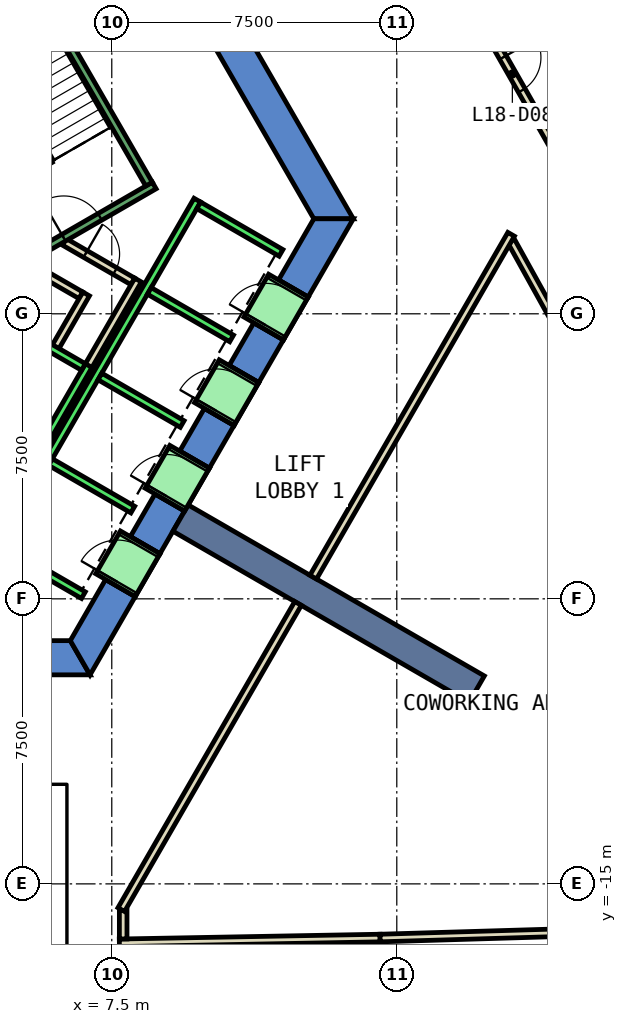
"""IFC4 building model, lengths in metres.
Left out: names, types, materials, properties, quantities, classifications, styles, units other than length and angle.
Written with IfcOpenShell. Run it as: python <this file> out.ifc"""

import sys

from ifc_helpers import new_model, si_unit, direction, frame, frame_2d, origin, place, context, subcontext, project, spatial, polyline, rectangle, outline, extrude, element, fill, save


model = new_model("IFC4")
c1 = context("Model", 3, precision=1e-05, world=origin(), true_north=direction((0.0, 1.0)))
c2 = subcontext(c1, "Body", "Model", "MODEL_VIEW")
j1 = project(units=[si_unit("LENGTHUNIT", "METRE"), si_unit("PLANEANGLEUNIT", "RADIAN")], contexts=[c1])
p1 = place(None, origin())
s1 = spatial("IfcSite", under=j1, at=p1, CompositionType="ELEMENT")
p2 = place(p1, origin())
s2 = spatial("IfcBuilding", under=s1, at=p2, CompositionType="ELEMENT")
p3 = place(p2, frame((0.0, 0.0, 86.6)))
s3 = spatial("IfcBuildingStorey", under=s2, at=p3, CompositionType="ELEMENT", Elevation=86.6)
p4 = place(p3, frame((0.0, 0.0, -0.6)))
e1 = element("IfcWall", 1, at=p4, inside=s3, PredefinedType="SHEAR", context=c2, shape_type="SweptSolid", body=[
    extrude(outline(polyline([(8.517, 11.748), (7.738, 11.298), (12.817, 2.5), (13.856, 2.5), (8.517, 11.748)])), origin(), (0.0, 0.0, 1.0), 4.4),
])
p5 = place(p3, frame((0.0, 0.0, -0.6)))
e2 = element("IfcWall", 2, at=p5, inside=s3, PredefinedType="SHEAR", context=c2, shape_type="SweptSolid", body=[
    extrude(outline(polyline([(5.75, -8.6), (5.75, -9.5), (6.928, -9.5), (6.409, -8.6), (5.75, -8.6)])), origin(), (0.0, 0.0, 1.0), 4.4),
])
p6 = place(p3, frame((0.0, 0.0, -0.6)))
e3 = element("IfcWall", 3, at=p6, inside=s3, PredefinedType="SHEAR", context=c2, shape_type="SweptSolid", body=[
    extrude(outline(polyline([(8.117, -7.44), (7.338, -6.99), (6.409, -8.6), (6.928, -9.5), (8.117, -7.44)])), origin(), (0.0, 0.0, 1.0), 4.4),
])
p7 = place(p3, frame((0.0, 0.0, -0.6)))
e4 = element("IfcWall", 4, at=p7, inside=s3, PredefinedType="SHEAR", context=c2, shape_type="SweptSolid", body=[
    extrude(outline(polyline([(9.417, -5.189), (8.638, -4.739), (7.988, -5.864), (8.767, -6.314), (9.417, -5.189)])), origin(), (0.0, 0.0, 1.0), 4.4),
])
p8 = place(p3, frame((0.0, 0.0, -0.6)))
e5 = element("IfcWall", 5, at=p8, inside=s3, PredefinedType="SHEAR", context=c2, shape_type="SweptSolid", body=[
    extrude(outline(polyline([(10.717, -2.937), (9.938, -2.487), (9.288, -3.613), (10.067, -4.063), (10.717, -2.937)])), origin(), (0.0, 0.0, 1.0), 4.4),
])
p9 = place(p3, frame((0.0, 0.0, -0.6)))
e6 = element("IfcWall", 6, at=p9, inside=s3, PredefinedType="SHEAR", context=c2, shape_type="SweptSolid", body=[
    extrude(outline(polyline([(12.017, -0.686), (11.238, -0.236), (10.588, -1.361), (11.367, -1.811), (12.017, -0.686)])), origin(), (0.0, 0.0, 1.0), 4.4),
])
p10 = place(p3, frame((0.0, 0.0, -0.6)))
e7 = element("IfcWall", 7, at=p10, inside=s3, PredefinedType="SHEAR", context=c2, shape_type="SweptSolid", body=[
    extrude(outline(polyline([(11.888, 0.89), (12.667, 0.44), (13.856, 2.5), (12.817, 2.5), (11.888, 0.89)])), origin(), (0.0, 0.0, 1.0), 4.4),
])
p11 = place(p3, frame((0.0, 0.0, 3.6)))
e8 = element("IfcWall", 8, at=p11, inside=s3, PredefinedType="SHEAR", context=c2, shape_type="SweptSolid", body=[
    extrude(outline(polyline([(8.767, -6.314), (7.988, -5.864), (7.338, -6.99), (8.117, -7.44), (8.767, -6.314)])), origin(), (0.0, 0.0, 1.0), 0.2),
])
p12 = place(p3, frame((0.0, 0.0, 3.6)))
e9 = element("IfcWall", 9, at=p12, inside=s3, PredefinedType="SHEAR", context=c2, shape_type="SweptSolid", body=[
    extrude(outline(polyline([(10.067, -4.063), (9.288, -3.613), (8.638, -4.739), (9.417, -5.189), (10.067, -4.063)])), origin(), (0.0, 0.0, 1.0), 0.2),
])
p13 = place(p3, frame((0.0, 0.0, 3.6)))
e10 = element("IfcWall", 10, at=p13, inside=s3, PredefinedType="SHEAR", context=c2, shape_type="SweptSolid", body=[
    extrude(outline(polyline([(11.367, -1.811), (10.588, -1.361), (9.938, -2.487), (10.717, -2.937), (11.367, -1.811)])), origin(), (0.0, 0.0, 1.0), 0.2),
])
p14 = place(p3, frame((0.0, 0.0, 3.6)))
e11 = element("IfcWall", 11, at=p14, inside=s3, PredefinedType="SHEAR", context=c2, shape_type="SweptSolid", body=[
    extrude(outline(polyline([(12.667, 0.44), (11.888, 0.89), (11.238, -0.236), (12.017, -0.686), (12.667, 0.44)])), origin(), (0.0, 0.0, 1.0), 0.2),
])
p15 = place(p3, frame((9.31, -5.375, -0.6), z_axis=(0.0, 0.0, 1.0), x_axis=(0.866017533419, -0.500013631625, 0.0)))
e12 = element("IfcWall", 12, at=p15, inside=s3, PredefinedType="SHEAR", context=c2, shape_type="SweptSolid", body=[
    extrude(rectangle(XDim=9.0, YDim=0.8, at=frame_2d((4.5, 0.0))), origin(), (0.0, 0.0, 1.0), 4.4),
])
p16 = place(p3, frame((7.7, -16.551, 0.0), z_axis=(0.0, 0.0, 1.0), x_axis=(0.999831478914, 0.018357934851, 0.0)))
e13 = element("IfcWall", 13, at=p16, inside=s3, PredefinedType="PARTITIONING", context=c2, shape_type="SweptSolid", body=[
    extrude(rectangle(XDim=6.862, YDim=0.2, at=frame_2d((3.431, 0.0))), origin(), (0.0, 0.0, 1.0), 3.8),
])
p17 = place(p3, frame((14.561, -16.425, 0.0), z_axis=(0.0, 0.0, 1.0), x_axis=(0.99955668677, 0.029772973188, 0.0)))
e14 = element("IfcWall", 14, at=p17, inside=s3, PredefinedType="PARTITIONING", context=c2, shape_type="SweptSolid", body=[
    extrude(rectangle(XDim=6.888, YDim=0.2, at=frame_2d((3.444, 0.0))), origin(), (0.0, 0.0, 1.0), 3.8),
])
p18 = place(p3, frame((21.317, -4.053, 0.0), z_axis=(0.0, 0.0, 1.0), x_axis=(-0.484816829319, 0.874615711046, 0.0)))
e15 = element("IfcWall", 15, at=p18, inside=s3, PredefinedType="PARTITIONING", context=c2, shape_type="SweptSolid", body=[
    extrude(rectangle(XDim=6.827, YDim=0.2, at=frame_2d((3.414, 0.0))), origin(), (0.0, 0.0, 1.0), 3.8),
])
p19 = place(p3, frame((16.243, 9.465, 0.0), z_axis=(0.0, 0.0, 1.0), x_axis=(0.495081262009, -0.868846674625, 0.0)))
e16 = element("IfcWall", 16, at=p19, inside=s3, PredefinedType="PARTITIONING", context=c2, shape_type="SweptSolid", body=[
    extrude(rectangle(XDim=7.112, YDim=0.2, at=frame_2d((3.556, 0.0))), origin(), (0.0, 0.0, 1.0), 3.8),
])
p20 = place(p19, frame((3.131, 0.0, 0.0)))
e17 = element("IfcOpeningElement", 17, at=p20, cuts=e16, PredefinedType="OPENING", context=c2, shape_type="SweptSolid", body=[
    extrude(rectangle(XDim=1.0, YDim=2.1, at=frame_2d((0.5, 1.05))), frame((0.0, 0.11, 0.0), z_axis=(0.0, -1.0, 0.0), x_axis=(1.0, 0.0, 0.0)), (0.0, 0.0, 1.0), 0.22),
])
p21 = place(p3, frame((5.499, 1.172, 0.0), z_axis=(0.0, 0.0, 1.0), x_axis=(0.866333505267, -0.499465972466, 0.0)))
e18 = element("IfcWall", 18, at=p21, inside=s3, PredefinedType="PARTITIONING", context=c2, shape_type="SweptSolid", body=[
    extrude(rectangle(XDim=1.374, YDim=0.2, at=frame_2d((0.687, 0.0))), origin(), (0.0, 0.0, 1.0), 3.8),
])
p22 = place(p3, frame((6.826, 0.522, 0.0), z_axis=(0.0, 0.0, 1.0), x_axis=(-0.500016722714, -0.866015748706, 0.0)))
e19 = element("IfcWall", 19, at=p22, inside=s3, PredefinedType="PARTITIONING", context=c2, shape_type="SweptSolid", body=[
    extrude(rectangle(XDim=1.7, YDim=0.2, at=frame_2d((0.85, 0.0))), origin(), (0.0, 0.0, 1.0), 3.8),
])
p23 = place(p3, frame((6.25, 1.894, 0.0), z_axis=(0.0, 0.0, 1.0), x_axis=(0.866043184279, -0.499969202016, 0.0)))
e20 = element("IfcWall", 20, at=p23, inside=s3, PredefinedType="PARTITIONING", context=c2, shape_type="SweptSolid", body=[
    extrude(rectangle(XDim=2.084, YDim=0.2, at=frame_2d((1.042, 0.0))), origin(), (0.0, 0.0, 1.0), 3.8),
])
p24 = place(p23, frame((0.642, 0.0, 0.0)))
e21 = element("IfcOpeningElement", 21, at=p24, cuts=e20, PredefinedType="OPENING", context=c2, shape_type="SweptSolid", body=[
    extrude(rectangle(XDim=0.9, YDim=2.1, at=frame_2d((0.45, 1.05))), frame((0.0, 0.11, 0.0), z_axis=(0.0, -1.0, 0.0), x_axis=(1.0, 0.0, 0.0)), (0.0, 0.0, 1.0), 0.22),
])
p25 = place(p3, frame((8.192, 0.888, 0.0), z_axis=(0.0, 0.0, 1.0), x_axis=(-0.499940625693, -0.866059680843, 0.0)))
e22 = element("IfcWall", 22, at=p25, inside=s3, PredefinedType="PARTITIONING", context=c2, shape_type="SweptSolid", body=[
    extrude(rectangle(XDim=2.68, YDim=0.2, at=frame_2d((1.34, 0.0))), origin(), (0.0, 0.0, 1.0), 3.8),
])
p26 = place(p3, frame((7.8, -15.69, 0.0), z_axis=(0.0, 0.0, 1.0), x_axis=(0.0, -1.0, 0.0)))
e23 = element("IfcWall", 23, at=p26, inside=s3, PredefinedType="PARTITIONING", context=c2, shape_type="SweptSolid", body=[
    extrude(rectangle(XDim=0.759, YDim=0.2, at=frame_2d((0.379, 0.0))), origin(), (0.0, 0.0, 1.0), 3.8),
])
p27 = place(p3, frame((18.009, 2.092, 0.0), z_axis=(0.0, 0.0, 1.0), x_axis=(-0.499980796252, -0.866036490789, 0.0)))
e24 = element("IfcWall", 24, at=p27, inside=s3, PredefinedType="PARTITIONING", context=c2, shape_type="SweptSolid", body=[
    extrude(rectangle(XDim=10.417, YDim=0.2, at=frame_2d((5.208, 0.0))), origin(), (0.0, 0.0, 1.0), 3.8),
])
p28 = place(p3, frame((12.401, -7.621, 0.0), z_axis=(0.0, 0.0, 1.0), x_axis=(-0.499983724212, -0.866034800411, 0.0)))
e25 = element("IfcWall", 25, at=p28, inside=s3, PredefinedType="PARTITIONING", context=c2, shape_type="SweptSolid", body=[
    extrude(rectangle(XDim=9.302, YDim=0.2, at=frame_2d((4.651, 0.0))), origin(), (0.0, 0.0, 1.0), 3.8),
])
p29 = place(p3, frame((5.492, -3.788, 0.0), z_axis=(0.0, 0.0, 1.0), x_axis=(0.500011755427, 0.866018616679, 0.0)))
e26 = element("IfcWall", 26, at=p29, inside=s3, PredefinedType="STANDARD", context=c2, shape_type="SweptSolid", body=[
    extrude(rectangle(XDim=2.8, YDim=0.2, at=frame_2d((1.4, 0.0))), origin(), (0.0, 0.0, 1.0), 3.8),
])
p30 = place(p3, frame((4.677, -0.2, 0.0), z_axis=(0.0, 0.0, 1.0), x_axis=(0.865973769406, -0.500089422704, 0.0)))
e27 = element("IfcWall", 27, at=p30, inside=s3, PredefinedType="STANDARD", context=c2, shape_type="SweptSolid", body=[
    extrude(rectangle(XDim=2.399, YDim=0.2, at=frame_2d((1.2, 0.0))), origin(), (0.0, 0.0, 1.0), 3.8),
])
p31 = place(p3, frame((4.451, -6.19, 0.0), z_axis=(0.0, 0.0, 1.0), x_axis=(0.50000090737, 0.866024879913, 0.0)))
e28 = element("IfcWall", 28, at=p31, inside=s3, PredefinedType="STANDARD", context=c2, shape_type="SweptSolid", body=[
    extrude(rectangle(XDim=10.6, YDim=0.2, at=frame_2d((5.3, 0.0))), origin(), (0.0, 0.0, 1.0), 3.8),
])
for number, where, z_axis, x_axis in (
    (29, (4.588, -6.153, 0.0), (0.0, 0.0, 1.0), (0.866, -0.5, 0.0)),
    (30, (5.888, -3.902, 0.0), (0.0, 0.0, 1.0), (0.866, -0.5, 0.0)),
    (31, (7.188, -1.65, 0.0), (0.0, 0.0, 1.0), (0.866, -0.5, 0.0)),
    (32, (8.488, 0.602, 0.0), (0.0, 0.0, 1.0), (0.866, -0.5, 0.0)),
):
    element("IfcWall", number, at=place(p3, frame(where, z_axis=z_axis, x_axis=x_axis)), inside=s3, PredefinedType="STANDARD", context=c2, shape_type="SweptSolid", body=[
        extrude(rectangle(XDim=2.5, YDim=0.2, at=frame_2d((1.25, 0.0))), origin(), (0.0, 0.0, 1.0), 3.8),
    ])
p32 = place(p3, frame((9.788, 2.853, 0.0), z_axis=(0.0, 0.0, 1.0), x_axis=(0.865998541277, -0.500046524342, 0.0)))
e33 = element("IfcWall", 33, at=p32, inside=s3, PredefinedType="STANDARD", context=c2, shape_type="SweptSolid", body=[
    extrude(rectangle(XDim=2.5, YDim=0.2, at=frame_2d((1.25, 0.0))), origin(), (0.0, 0.0, 1.0), 3.8),
])
p33 = place(p3, frame((7.598, -7.14, 0.0), z_axis=(0.0, 0.0, 1.0), x_axis=(0.500362116554, 0.865816234728, 0.0)))
e34 = element("IfcWall", 34, at=p33, inside=s3, PredefinedType="STANDARD", context=c2, shape_type="SweptSolid", body=[
    extrude(rectangle(XDim=1.299, YDim=1.2, at=frame_2d((0.65, 0.0))), origin(), (0.0, 0.0, 1.0), 2.4),
])
p34 = place(p33, frame((0.1, 0.0, 0.0)))
e35 = element("IfcOpeningElement", 35, at=p34, cuts=e34, PredefinedType="OPENING", context=c2, shape_type="SweptSolid", body=[
    extrude(rectangle(XDim=1.1, YDim=2.3, at=frame_2d((0.55, 1.15))), frame((0.0, 0.61, 0.0), z_axis=(0.0, -1.0, 0.0), x_axis=(1.0, 0.0, 0.0)), (0.0, 0.0, 1.0), 1.22),
])
p35 = place(p3, frame((8.898, -4.889, 0.0), z_axis=(0.0, 0.0, 1.0), x_axis=(0.500036693733, 0.866004217611, 0.0)))
e36 = element("IfcWall", 36, at=p35, inside=s3, PredefinedType="STANDARD", context=c2, shape_type="SweptSolid", body=[
    extrude(rectangle(XDim=1.3, YDim=1.2, at=frame_2d((0.65, 0.0))), origin(), (0.0, 0.0, 1.0), 2.4),
])
p36 = place(p35, frame((0.1, 0.0, 0.0)))
e37 = element("IfcOpeningElement", 37, at=p36, cuts=e36, PredefinedType="OPENING", context=c2, shape_type="SweptSolid", body=[
    extrude(rectangle(XDim=1.1, YDim=2.3, at=frame_2d((0.55, 1.15))), frame((0.0, 0.61, 0.0), z_axis=(0.0, -1.0, 0.0), x_axis=(1.0, 0.0, 0.0)), (0.0, 0.0, 1.0), 1.22),
])
p37 = place(p3, frame((10.198, -2.637, 0.0), z_axis=(0.0, 0.0, 1.0), x_axis=(0.49989585183, 0.866085525409, 0.0)))
e38 = element("IfcWall", 38, at=p37, inside=s3, PredefinedType="STANDARD", context=c2, shape_type="SweptSolid", body=[
    extrude(rectangle(XDim=1.3, YDim=1.2, at=frame_2d((0.65, 0.0))), origin(), (0.0, 0.0, 1.0), 2.4),
])
p38 = place(p37, frame((0.1, 0.0, 0.0)))
e39 = element("IfcOpeningElement", 39, at=p38, cuts=e38, PredefinedType="OPENING", context=c2, shape_type="SweptSolid", body=[
    extrude(rectangle(XDim=1.1, YDim=2.3, at=frame_2d((0.55, 1.15))), frame((0.0, 0.61, 0.0), z_axis=(0.0, -1.0, 0.0), x_axis=(1.0, 0.0, 0.0)), (0.0, 0.0, 1.0), 1.22),
])
p39 = place(p3, frame((11.498, -0.385, 0.0), z_axis=(0.0, 0.0, 1.0), x_axis=(0.500221244143, 0.865897630733, 0.0)))
e40 = element("IfcWall", 40, at=p39, inside=s3, PredefinedType="STANDARD", context=c2, shape_type="SweptSolid", body=[
    extrude(rectangle(XDim=1.299, YDim=1.2, at=frame_2d((0.65, 0.0))), origin(), (0.0, 0.0, 1.0), 2.4),
])
p40 = place(p39, frame((0.1, 0.0, 0.0)))
e41 = element("IfcOpeningElement", 41, at=p40, cuts=e40, PredefinedType="OPENING", context=c2, shape_type="SweptSolid", body=[
    extrude(rectangle(XDim=1.1, YDim=2.3, at=frame_2d((0.55, 1.15))), frame((0.0, 0.61, 0.0), z_axis=(0.0, -1.0, 0.0), x_axis=(1.0, 0.0, 0.0)), (0.0, 0.0, 1.0), 1.22),
])
p41 = place(p3, frame((4.806, 1.176, 0.0), z_axis=(0.0, 0.0, 1.0), x_axis=(0.866059941101, 0.499940174841, 0.0)))
e42 = element("IfcWall", 42, at=p41, inside=s3, PredefinedType="STANDARD", context=c2, shape_type="SweptSolid", body=[
    extrude(rectangle(XDim=4.4, YDim=0.2, at=frame_2d((2.2, 0.0))), origin(), (0.0, 0.0, 1.0), 3.8),
])
p42 = place(p41, frame((1.65, 0.0, 0.0)))
e43 = element("IfcOpeningElement", 43, at=p42, cuts=e42, PredefinedType="OPENING", context=c2, shape_type="SweptSolid", body=[
    extrude(rectangle(XDim=1.1, YDim=2.2, at=frame_2d((0.55, 1.1))), frame((0.0, 0.11, 0.0), z_axis=(0.0, -1.0, 0.0), x_axis=(1.0, 0.0, 0.0)), (0.0, 0.0, 1.0), 0.22),
])
p43 = place(p3, frame((8.48, 3.412, 0.0), z_axis=(0.0, 0.0, 1.0), x_axis=(-0.499978703459, 0.866037698999, 0.0)))
e44 = element("IfcWall", 44, at=p43, inside=s3, PredefinedType="STANDARD", context=c2, shape_type="SweptSolid", body=[
    extrude(rectangle(XDim=6.9, YDim=0.2, at=frame_2d((3.45, 0.0))), origin(), (0.0, 0.0, 1.0), 3.8),
])
p44 = place(p20, origin())
e45 = element("IfcDoor", 45, at=p44, inside=s3, OperationType="SINGLE_SWING_LEFT", PredefinedType="DOOR", context=c2, shape_type="SweptSolid", body=[
    extrude(rectangle(XDim=1.0, YDim=2.1, at=frame_2d((0.5, 1.05))), frame((0.0, 0.025, 0.0), z_axis=(0.0, -1.0, 0.0), x_axis=(1.0, 0.0, 0.0)), (0.0, 0.0, 1.0), 0.05),
])
fill(e17, e45)
p45 = place(p24, origin())
e46 = element("IfcDoor", 46, at=p45, inside=s3, OperationType="SINGLE_SWING_LEFT", PredefinedType="DOOR", context=c2, shape_type="SweptSolid", body=[
    extrude(rectangle(XDim=0.9, YDim=2.1, at=frame_2d((0.45, 1.05))), frame((0.0, 0.025, 0.0), z_axis=(0.0, -1.0, 0.0), x_axis=(1.0, 0.0, 0.0)), (0.0, 0.0, 1.0), 0.05),
])
fill(e21, e46)
p46 = place(p34, origin())
e47 = element("IfcDoor", 47, at=p46, inside=s3, OperationType="SLIDING_TO_LEFT", PredefinedType="DOOR", context=c2, shape_type="SweptSolid", body=[
    extrude(rectangle(XDim=1.1, YDim=2.3, at=frame_2d((0.55, 1.15))), frame((0.0, 0.025, 0.0), z_axis=(0.0, -1.0, 0.0), x_axis=(1.0, 0.0, 0.0)), (0.0, 0.0, 1.0), 0.05),
])
fill(e35, e47)
p47 = place(p36, origin())
e48 = element("IfcDoor", 48, at=p47, inside=s3, OperationType="SLIDING_TO_LEFT", PredefinedType="DOOR", context=c2, shape_type="SweptSolid", body=[
    extrude(rectangle(XDim=1.1, YDim=2.3, at=frame_2d((0.55, 1.15))), frame((0.0, 0.025, 0.0), z_axis=(0.0, -1.0, 0.0), x_axis=(1.0, 0.0, 0.0)), (0.0, 0.0, 1.0), 0.05),
])
fill(e37, e48)
p48 = place(p38, origin())
e49 = element("IfcDoor", 49, at=p48, inside=s3, OperationType="SLIDING_TO_LEFT", PredefinedType="DOOR", context=c2, shape_type="SweptSolid", body=[
    extrude(rectangle(XDim=1.1, YDim=2.3, at=frame_2d((0.55, 1.15))), frame((0.0, 0.025, 0.0), z_axis=(0.0, -1.0, 0.0), x_axis=(1.0, 0.0, 0.0)), (0.0, 0.0, 1.0), 0.05),
])
fill(e39, e49)
p49 = place(p40, origin())
e50 = element("IfcDoor", 50, at=p49, inside=s3, OperationType="SLIDING_TO_LEFT", PredefinedType="DOOR", context=c2, shape_type="SweptSolid", body=[
    extrude(rectangle(XDim=1.1, YDim=2.3, at=frame_2d((0.55, 1.15))), frame((0.0, 0.025, 0.0), z_axis=(0.0, -1.0, 0.0), x_axis=(1.0, 0.0, 0.0)), (0.0, 0.0, 1.0), 0.05),
])
fill(e41, e50)
p50 = place(p42, origin())
e51 = element("IfcDoor", 51, at=p50, inside=s3, OperationType="SINGLE_SWING_LEFT", PredefinedType="DOOR", context=c2, shape_type="SweptSolid", body=[
    extrude(rectangle(XDim=1.1, YDim=2.2, at=frame_2d((0.55, 1.1))), frame((0.0, 0.025, 0.0), z_axis=(0.0, -1.0, 0.0), x_axis=(1.0, 0.0, 0.0)), (0.0, 0.0, 1.0), 0.05),
])
fill(e43, e51)
save(model, sys.argv[1])
